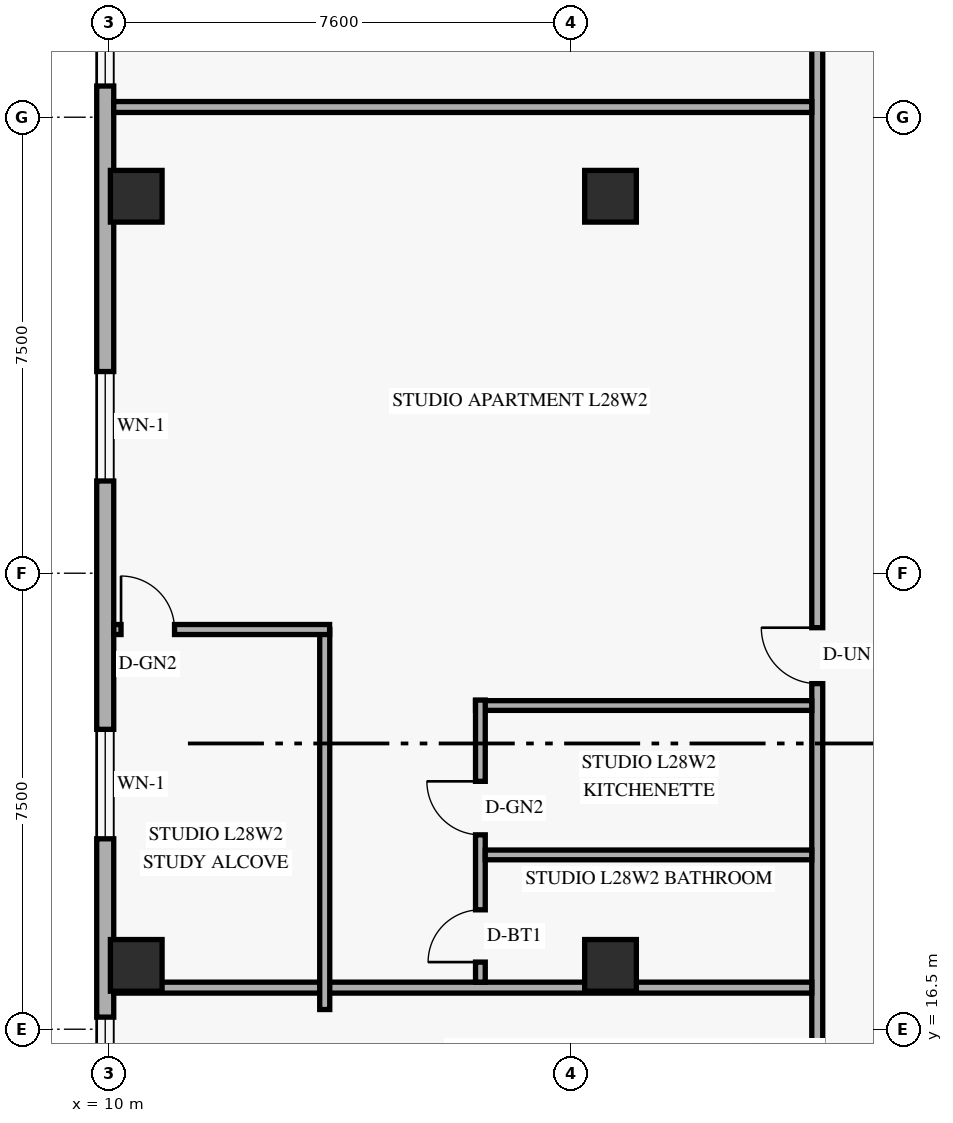
"""IFC4 building model, lengths in metres.
Left out: names, types, materials, properties, quantities, classifications, styles, units other than length and angle.
Written with IfcOpenShell. Run it as: python <this file> out.ifc"""

import sys

from ifc_helpers import new_model, si_unit, direction, frame, frame_2d, origin, origin_2d, place, context, subcontext, project, spatial, rectangle, extrude, element, fill, save


model = new_model("IFC4")
c1 = context("Model", 3, precision=1e-05, world=origin(), true_north=direction((0.0, 1.0)))
c2 = subcontext(c1, "Body", "Model", "MODEL_VIEW")
j1 = project(units=[si_unit("LENGTHUNIT", "METRE"), si_unit("PLANEANGLEUNIT", "RADIAN")], contexts=[c1])
p1 = place(None, origin())
s1 = spatial("IfcSite", under=j1, at=p1, CompositionType="ELEMENT")
p2 = place(p1, origin())
s2 = spatial("IfcBuilding", under=s1, at=p2, CompositionType="ELEMENT")
p3 = place(p2, frame((0.0, 0.0, 109.8)))
s3 = spatial("IfcBuildingStorey", under=s2, at=p3, CompositionType="ELEMENT", Elevation=109.8)
for number, where, z_axis, x_axis in (
    (1, (10.45, 17.55, 0.0), (0.0, 0.0, 1.0), (1.0, 0.0, 0.0)),
    (2, (10.45, 30.2, 0.0), (0.0, 0.0, 1.0), (1.0, 0.0, 0.0)),
    (3, (18.25, 17.55, 0.0), (0.0, 0.0, 1.0), (1.0, 0.0, 0.0)),
    (4, (18.25, 30.2, 0.0), (0.0, 0.0, 1.0), (1.0, 0.0, 0.0)),
):
    element("IfcColumn", number, at=place(p3, frame(where, z_axis=z_axis, x_axis=x_axis)), inside=s3, PredefinedType="COLUMN", context=c2, shape_type="SweptSolid", body=[
        extrude(rectangle(XDim=0.85, YDim=0.85, at=origin_2d()), origin(), (0.0, 0.0, 1.0), 3.6),
    ])
p4 = place(p3, frame((9.94, 41.68, 0.0), z_axis=(0.0, 0.0, 1.0), x_axis=(0.0, -1.0, 0.0)))
e5 = element("IfcWall", 5, at=p4, inside=s3, PredefinedType="SOLIDWALL", context=c2, shape_type="SweptSolid", body=[
    extrude(rectangle(XDim=35.36, YDim=0.28, at=frame_2d((17.68, 0.0))), origin(), (0.0, 0.0, 1.0), 3.36),
])
p5 = place(p4, frame((28.691, 0.0, 0.85)))
e6 = element("IfcOpeningElement", 6, at=p5, cuts=e5, PredefinedType="OPENING", context=c2, shape_type="SweptSolid", body=[
    extrude(rectangle(XDim=1.8, YDim=1.6, at=frame_2d((0.9, 0.8))), frame((0.0, 0.15, 0.0), z_axis=(0.0, -1.0, 0.0), x_axis=(1.0, 0.0, 0.0)), (0.0, 0.0, 1.0), 0.3),
])
p6 = place(p4, frame((24.981, 0.0, 0.85)))
e7 = element("IfcOpeningElement", 7, at=p6, cuts=e5, PredefinedType="OPENING", context=c2, shape_type="SweptSolid", body=[
    extrude(rectangle(XDim=1.8, YDim=1.6, at=frame_2d((0.9, 0.8))), frame((0.0, 0.15, 0.0), z_axis=(0.0, -1.0, 0.0), x_axis=(1.0, 0.0, 0.0)), (0.0, 0.0, 1.0), 0.3),
])
p7 = place(p4, frame((20.248, 0.0, 0.85)))
e8 = element("IfcOpeningElement", 8, at=p7, cuts=e5, PredefinedType="OPENING", context=c2, shape_type="SweptSolid", body=[
    extrude(rectangle(XDim=1.8, YDim=1.6, at=frame_2d((0.9, 0.8))), frame((0.0, 0.15, 0.0), z_axis=(0.0, -1.0, 0.0), x_axis=(1.0, 0.0, 0.0)), (0.0, 0.0, 1.0), 0.3),
])
p8 = place(p4, frame((14.363, 0.0, 0.85)))
e9 = element("IfcOpeningElement", 9, at=p8, cuts=e5, PredefinedType="OPENING", context=c2, shape_type="SweptSolid", body=[
    extrude(rectangle(XDim=1.8, YDim=1.6, at=frame_2d((0.9, 0.8))), frame((0.0, 0.15, 0.0), z_axis=(0.0, -1.0, 0.0), x_axis=(1.0, 0.0, 0.0)), (0.0, 0.0, 1.0), 0.3),
])
p9 = place(p4, frame((7.867, 0.0, 0.85)))
e10 = element("IfcOpeningElement", 10, at=p9, cuts=e5, PredefinedType="OPENING", context=c2, shape_type="SweptSolid", body=[
    extrude(rectangle(XDim=1.8, YDim=1.6, at=frame_2d((0.9, 0.8))), frame((0.0, 0.15, 0.0), z_axis=(0.0, -1.0, 0.0), x_axis=(1.0, 0.0, 0.0)), (0.0, 0.0, 1.0), 0.3),
])
p10 = place(p4, frame((4.546, 0.0, 0.85)))
e11 = element("IfcOpeningElement", 11, at=p10, cuts=e5, PredefinedType="OPENING", context=c2, shape_type="SweptSolid", body=[
    extrude(rectangle(XDim=1.8, YDim=1.6, at=frame_2d((0.9, 0.8))), frame((0.0, 0.15, 0.0), z_axis=(0.0, -1.0, 0.0), x_axis=(1.0, 0.0, 0.0)), (0.0, 0.0, 1.0), 0.3),
])
p11 = place(p3, frame((21.65, 6.8, 0.0), z_axis=(0.0, 0.0, 1.0), x_axis=(0.0, 1.0, 0.0)))
e12 = element("IfcWall", 12, at=p11, inside=s3, PredefinedType="STANDARD", context=c2, shape_type="SweptSolid", body=[
    extrude(rectangle(XDim=34.4, YDim=0.18, at=frame_2d((17.2, 0.0))), origin(), (0.0, 0.0, 1.0), 2.731),
])
p12 = place(p11, frame((4.785, 0.0, 0.0)))
e13 = element("IfcOpeningElement", 13, at=p12, cuts=e12, PredefinedType="OPENING", context=c2, shape_type="SweptSolid", body=[
    extrude(rectangle(XDim=0.92, YDim=2.15, at=frame_2d((0.46, 1.075))), frame((0.0, 0.1, 0.0), z_axis=(0.0, -1.0, 0.0), x_axis=(1.0, 0.0, 0.0)), (0.0, 0.0, 1.0), 0.2),
])
p13 = place(p11, frame((15.384, 0.0, 0.0)))
e14 = element("IfcOpeningElement", 14, at=p13, cuts=e12, PredefinedType="OPENING", context=c2, shape_type="SweptSolid", body=[
    extrude(rectangle(XDim=0.92, YDim=2.15, at=frame_2d((0.46, 1.075))), frame((0.0, 0.1, 0.0), z_axis=(0.0, -1.0, 0.0), x_axis=(1.0, 0.0, 0.0)), (0.0, 0.0, 1.0), 0.2),
])
p14 = place(p11, frame((28.41, 0.0, 0.0)))
e15 = element("IfcOpeningElement", 15, at=p14, cuts=e12, PredefinedType="OPENING", context=c2, shape_type="SweptSolid", body=[
    extrude(rectangle(XDim=0.92, YDim=2.15, at=frame_2d((0.46, 1.075))), frame((0.0, 0.1, 0.0), z_axis=(0.0, -1.0, 0.0), x_axis=(1.0, 0.0, 0.0)), (0.0, 0.0, 1.0), 0.2),
])
p15 = place(p3, frame((10.08, 17.184, 0.0), z_axis=(0.0, 0.0, 1.0), x_axis=(1.0, 0.0, 0.0)))
e16 = element("IfcWall", 16, at=p15, inside=s3, PredefinedType="PARTITIONING", context=c2, shape_type="SweptSolid", body=[
    extrude(rectangle(XDim=11.48, YDim=0.18, at=frame_2d((5.74, 0.0))), origin(), (0.0, 0.0, 1.0), 2.731),
])
p16 = place(p3, frame((16.03, 21.824, 0.0), z_axis=(0.0, 0.0, 1.0), x_axis=(1.0, 0.0, 0.0)))
e17 = element("IfcWall", 17, at=p16, inside=s3, PredefinedType="PLUMBINGWALL", context=c2, shape_type="SweptSolid", body=[
    extrude(rectangle(XDim=5.53, YDim=0.16, at=frame_2d((2.765, 0.0))), origin(), (0.0, 0.0, 1.0), 2.731),
])
p17 = place(p3, frame((16.11, 17.274, 0.0), z_axis=(0.0, 0.0, 1.0), x_axis=(0.0, 1.0, 0.0)))
e18 = element("IfcWall", 18, at=p17, inside=s3, PredefinedType="PLUMBINGWALL", context=c2, shape_type="SweptSolid", body=[
    extrude(rectangle(XDim=4.64, YDim=0.16, at=frame_2d((2.32, 0.0))), origin(), (0.0, 0.0, 1.0), 2.731),
])
p18 = place(p17, frame((0.33, 0.0, 0.0)))
e19 = element("IfcOpeningElement", 19, at=p18, cuts=e18, PredefinedType="OPENING", context=c2, shape_type="SweptSolid", body=[
    extrude(rectangle(XDim=0.86, YDim=2.12, at=frame_2d((0.43, 1.06))), frame((0.0, 0.09, 0.0), z_axis=(0.0, -1.0, 0.0), x_axis=(1.0, 0.0, 0.0)), (0.0, 0.0, 1.0), 0.18),
])
p19 = place(p17, frame((2.423, 0.0, 0.0)))
e20 = element("IfcOpeningElement", 20, at=p19, cuts=e18, PredefinedType="OPENING", context=c2, shape_type="SweptSolid", body=[
    extrude(rectangle(XDim=0.88, YDim=2.12, at=frame_2d((0.44, 1.06))), frame((0.0, 0.09, 0.0), z_axis=(0.0, -1.0, 0.0), x_axis=(1.0, 0.0, 0.0)), (0.0, 0.0, 1.0), 0.18),
])
p20 = place(p3, frame((16.19, 19.367, 0.0), z_axis=(0.0, 0.0, 1.0), x_axis=(1.0, 0.0, 0.0)))
e21 = element("IfcWall", 21, at=p20, inside=s3, PredefinedType="PLUMBINGWALL", context=c2, shape_type="SweptSolid", body=[
    extrude(rectangle(XDim=5.37, YDim=0.16, at=frame_2d((2.685, 0.0))), origin(), (0.0, 0.0, 1.0), 2.731),
])
p21 = place(p3, frame((13.55, 16.824, 0.0), z_axis=(0.0, 0.0, 1.0), x_axis=(0.0, 1.0, 0.0)))
e22 = element("IfcWall", 22, at=p21, inside=s3, PredefinedType="PARTITIONING", context=c2, shape_type="SweptSolid", body=[
    extrude(rectangle(XDim=6.25, YDim=0.165, at=frame_2d((3.125, 0.0))), origin(), (0.0, 0.0, 1.0), 2.731),
])
p22 = place(p3, frame((10.08, 23.074, 0.0), z_axis=(0.0, 0.0, 1.0), x_axis=(1.0, 0.0, 0.0)))
e23 = element("IfcWall", 23, at=p22, inside=s3, PredefinedType="PARTITIONING", context=c2, shape_type="SweptSolid", body=[
    extrude(rectangle(XDim=3.55, YDim=0.165, at=frame_2d((1.775, 0.0))), origin(), (0.0, 0.0, 1.0), 2.809),
])
p23 = place(p22, frame((0.12, 0.0, 0.0)))
e24 = element("IfcOpeningElement", 24, at=p23, cuts=e23, PredefinedType="OPENING", context=c2, shape_type="SweptSolid", body=[
    extrude(rectangle(XDim=0.88, YDim=2.12, at=frame_2d((0.44, 1.06))), frame((0.0, 0.093, 0.0), z_axis=(0.0, -1.0, 0.0), x_axis=(1.0, 0.0, 0.0)), (0.0, 0.0, 1.0), 0.185),
])
p24 = place(p3, frame((10.08, 31.668, 0.0), z_axis=(0.0, 0.0, 1.0), x_axis=(1.0, 0.0, 0.0)))
e25 = element("IfcWall", 25, at=p24, inside=s3, PredefinedType="PARTITIONING", context=c2, shape_type="SweptSolid", body=[
    extrude(rectangle(XDim=11.48, YDim=0.18, at=frame_2d((5.74, 0.0))), origin(), (0.0, 0.0, 1.0), 2.731),
])
p25 = place(p6, origin())
e26 = element("IfcWindow", 26, at=p25, inside=s3, PartitioningType="SINGLE_PANEL", PredefinedType="WINDOW", context=c2, shape_type="SweptSolid", body=[
    extrude(rectangle(XDim=1.8, YDim=1.6, at=frame_2d((0.9, 0.8))), frame((0.0, 0.03, 0.0), z_axis=(0.0, -1.0, 0.0), x_axis=(1.0, 0.0, 0.0)), (0.0, 0.0, 1.0), 0.06),
])
fill(e7, e26)
p26 = place(p7, origin())
e27 = element("IfcWindow", 27, at=p26, inside=s3, PartitioningType="SINGLE_PANEL", PredefinedType="WINDOW", context=c2, shape_type="SweptSolid", body=[
    extrude(rectangle(XDim=1.8, YDim=1.6, at=frame_2d((0.9, 0.8))), frame((0.0, 0.03, 0.0), z_axis=(0.0, -1.0, 0.0), x_axis=(1.0, 0.0, 0.0)), (0.0, 0.0, 1.0), 0.06),
])
fill(e8, e27)
p27 = place(p8, origin())
e28 = element("IfcWindow", 28, at=p27, inside=s3, PartitioningType="SINGLE_PANEL", PredefinedType="WINDOW", context=c2, shape_type="SweptSolid", body=[
    extrude(rectangle(XDim=1.8, YDim=1.6, at=frame_2d((0.9, 0.8))), frame((0.0, 0.03, 0.0), z_axis=(0.0, -1.0, 0.0), x_axis=(1.0, 0.0, 0.0)), (0.0, 0.0, 1.0), 0.06),
])
fill(e9, e28)
p28 = place(p9, origin())
e29 = element("IfcWindow", 29, at=p28, inside=s3, PartitioningType="SINGLE_PANEL", PredefinedType="WINDOW", context=c2, shape_type="SweptSolid", body=[
    extrude(rectangle(XDim=1.8, YDim=1.6, at=frame_2d((0.9, 0.8))), frame((0.0, 0.03, 0.0), z_axis=(0.0, -1.0, 0.0), x_axis=(1.0, 0.0, 0.0)), (0.0, 0.0, 1.0), 0.06),
])
fill(e10, e29)
p29 = place(p23, origin())
e30 = element("IfcDoor", 30, at=p29, inside=s3, OperationType="SINGLE_SWING_LEFT", PredefinedType="DOOR", context=c2, shape_type="SweptSolid", body=[
    extrude(rectangle(XDim=0.88, YDim=2.12, at=frame_2d((0.44, 1.06))), frame((0.0, 0.025, 0.0), z_axis=(0.0, -1.0, 0.0), x_axis=(1.0, 0.0, 0.0)), (0.0, 0.0, 1.0), 0.05),
])
fill(e24, e30)
p30 = place(p13, origin())
e31 = element("IfcDoor", 31, at=p30, inside=s3, OperationType="SINGLE_SWING_RIGHT", PredefinedType="DOOR", context=c2, shape_type="SweptSolid", body=[
    extrude(rectangle(XDim=0.92, YDim=2.15, at=frame_2d((0.46, 1.075))), frame((0.0, 0.025, 0.0), z_axis=(0.0, -1.0, 0.0), x_axis=(1.0, 0.0, 0.0)), (0.0, 0.0, 1.0), 0.05),
])
fill(e14, e31)
p31 = place(p18, origin())
e32 = element("IfcDoor", 32, at=p31, inside=s3, OperationType="SINGLE_SWING_LEFT", PredefinedType="DOOR", context=c2, shape_type="SweptSolid", body=[
    extrude(rectangle(XDim=0.86, YDim=2.12, at=frame_2d((0.43, 1.06))), frame((0.0, 0.025, 0.0), z_axis=(0.0, -1.0, 0.0), x_axis=(1.0, 0.0, 0.0)), (0.0, 0.0, 1.0), 0.05),
])
fill(e19, e32)
p32 = place(p19, origin())
e33 = element("IfcDoor", 33, at=p32, inside=s3, OperationType="SINGLE_SWING_RIGHT", PredefinedType="DOOR", context=c2, shape_type="SweptSolid", body=[
    extrude(rectangle(XDim=0.88, YDim=2.12, at=frame_2d((0.44, 1.06))), frame((0.0, 0.025, 0.0), z_axis=(0.0, -1.0, 0.0), x_axis=(1.0, 0.0, 0.0)), (0.0, 0.0, 1.0), 0.05),
])
fill(e20, e33)
save(model, sys.argv[1])
